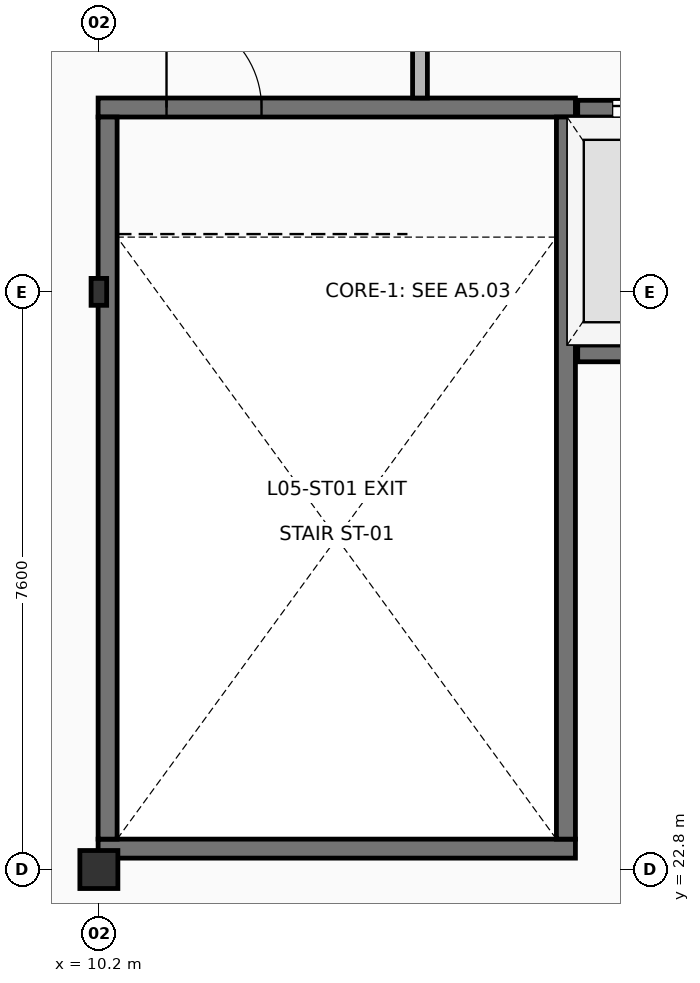
"""IFC4 building model, lengths in metres.
Left out: names, types, materials, properties, quantities, classifications, styles, units other than length and angle.
Written with IfcOpenShell. Run it as: python <this file> out.ifc"""

import sys

from ifc_helpers import new_model, si_unit, direction, frame, frame_2d, origin, origin_2d, place, context, subcontext, project, spatial, rectangle, i_section, extrude, element, fill, save


model = new_model("IFC4")
c1 = context("Model", 3, precision=1e-05, world=origin(), true_north=direction((0.0, 1.0)))
c2 = subcontext(c1, "Body", "Model", "MODEL_VIEW")
j1 = project(units=[si_unit("LENGTHUNIT", "METRE"), si_unit("PLANEANGLEUNIT", "RADIAN")], contexts=[c1])
p1 = place(None, origin())
s1 = spatial("IfcSite", under=j1, at=p1, CompositionType="ELEMENT")
p2 = place(p1, origin())
s2 = spatial("IfcBuilding", under=s1, at=p2, CompositionType="ELEMENT")
p3 = place(p2, frame((0.0, 0.0, 19.8)))
s3 = spatial("IfcBuildingStorey", under=s2, at=p3, CompositionType="ELEMENT", Elevation=19.8)
p4 = place(p3, frame((10.2, 22.8, 0.0), z_axis=(0.0, 0.0, 1.0), x_axis=(1.0, 0.0, 0.0)))
e1 = element("IfcColumn", 1, at=p4, inside=s3, PredefinedType="COLUMN", context=c2, shape_type="SweptSolid", body=[
    extrude(rectangle(XDim=0.5, YDim=0.5, at=origin_2d()), origin(), (0.0, 0.0, 1.0), 4.2),
])
p5 = place(p3, frame((10.2, 30.4, 0.0), z_axis=(0.0, 0.0, 1.0), x_axis=(1.0, 0.0, 0.0)))
e2 = element("IfcColumn", 2, at=p5, inside=s3, PredefinedType="COLUMN", context=c2, shape_type="SweptSolid", body=[
    extrude(i_section(OverallWidth=0.205, OverallDepth=0.354, WebThickness=0.01, FlangeThickness=0.017, at=origin_2d()), origin(), (0.0, 0.0, 1.0), 4.2),
])
p6 = place(p3, frame((10.19, 23.075, 0.0), z_axis=(0.0, 0.0, 1.0), x_axis=(1.0, 0.0, 0.0)))
e3 = element("IfcWall", 3, at=p6, inside=s3, PredefinedType="SHEAR", context=c2, shape_type="SweptSolid", body=[
    extrude(rectangle(XDim=6.28, YDim=0.25, at=frame_2d((3.14, 0.0))), origin(), (0.0, 0.0, 1.0), 3.96),
])
p7 = place(p3, frame((10.19, 32.825, 0.0), z_axis=(0.0, 0.0, 1.0), x_axis=(1.0, 0.0, 0.0)))
e4 = element("IfcWall", 4, at=p7, inside=s3, PredefinedType="SHEAR", context=c2, shape_type="SweptSolid", body=[
    extrude(rectangle(XDim=6.28, YDim=0.25, at=frame_2d((3.14, 0.0))), origin(), (0.0, 0.0, 1.0), 3.96),
])
p8 = place(p7, frame((0.9, 0.0, 0.0)))
e5 = element("IfcOpeningElement", 5, at=p8, cuts=e4, PredefinedType="OPENING", context=c2, shape_type="SweptSolid", body=[
    extrude(rectangle(XDim=1.25, YDim=2.2, at=frame_2d((0.625, 1.1))), frame((0.0, 0.135, 0.0), z_axis=(0.0, -1.0, 0.0), x_axis=(1.0, 0.0, 0.0)), (0.0, 0.0, 1.0), 0.27),
])
for number, where, z_axis, x_axis in (
    (6, (10.315, 23.2, 0.0), (0.0, 0.0, 1.0), (0.0, 1.0, 0.0)),
    (7, (16.345, 23.2, 0.0), (0.0, 0.0, 1.0), (0.0, 1.0, 0.0)),
):
    element("IfcWall", number, at=place(p3, frame(where, z_axis=z_axis, x_axis=x_axis)), inside=s3, PredefinedType="SHEAR", context=c2, shape_type="SweptSolid", body=[
        extrude(rectangle(XDim=9.5, YDim=0.25, at=frame_2d((4.75, 0.0))), origin(), (0.0, 0.0, 1.0), 3.96),
    ])
p9 = place(p3, frame((16.5, 29.59, 0.0), z_axis=(0.0, 0.0, 1.0), x_axis=(1.0, 0.0, 0.0)))
e8 = element("IfcWall", 8, at=p9, inside=s3, PredefinedType="SHEAR", context=c2, shape_type="SweptSolid", body=[
    extrude(rectangle(XDim=2.12, YDim=0.22, at=frame_2d((1.06, 0.0))), origin(), (0.0, 0.0, 1.0), 3.96),
])
p10 = place(p3, frame((16.5, 32.81, 0.0), z_axis=(0.0, 0.0, 1.0), x_axis=(1.0, 0.0, 0.0)))
e9 = element("IfcWall", 9, at=p10, inside=s3, PredefinedType="SHEAR", context=c2, shape_type="SweptSolid", body=[
    extrude(rectangle(XDim=2.12, YDim=0.22, at=frame_2d((1.06, 0.0))), origin(), (0.0, 0.0, 1.0), 3.96),
])
p11 = place(p10, frame((0.46, 0.0, 0.0)))
e10 = element("IfcOpeningElement", 10, at=p11, cuts=e9, PredefinedType="OPENING", context=c2, shape_type="SweptSolid", body=[
    extrude(rectangle(XDim=1.2, YDim=2.2, at=frame_2d((0.6, 1.1))), frame((0.0, 0.12, 0.0), z_axis=(0.0, -1.0, 0.0), x_axis=(1.0, 0.0, 0.0)), (0.0, 0.0, 1.0), 0.24),
])
p12 = place(p3, frame((14.425, 32.95, 0.0), z_axis=(0.0, 0.0, 1.0), x_axis=(0.0, 1.0, 0.0)))
e11 = element("IfcWall", 11, at=p12, inside=s3, PredefinedType="PARTITIONING", context=c2, shape_type="SweptSolid", body=[
    extrude(rectangle(XDim=4.5, YDim=0.195, at=frame_2d((2.25, 0.0))), origin(), (0.0, 0.0, 1.0), 3.96),
])
p13 = place(p12, frame((1.7, 0.0, 0.0)))
e12 = element("IfcOpeningElement", 12, at=p13, cuts=e11, PredefinedType="OPENING", context=c2, shape_type="SweptSolid", body=[
    extrude(rectangle(XDim=1.1, YDim=2.15, at=frame_2d((0.55, 1.075))), frame((0.0, 0.107, 0.0), z_axis=(0.0, -1.0, 0.0), x_axis=(1.0, 0.0, 0.0)), (0.0, 0.0, 1.0), 0.215),
])
p14 = place(p8, origin())
e13 = element("IfcDoor", 13, at=p14, inside=s3, OperationType="SINGLE_SWING_LEFT", PredefinedType="DOOR", context=c2, shape_type="SweptSolid", body=[
    extrude(rectangle(XDim=1.25, YDim=2.2, at=frame_2d((0.625, 1.1))), frame((0.0, 0.025, 0.0), z_axis=(0.0, -1.0, 0.0), x_axis=(1.0, 0.0, 0.0)), (0.0, 0.0, 1.0), 0.05),
])
fill(e5, e13)
p15 = place(p11, origin())
e14 = element("IfcDoor", 14, at=p15, inside=s3, OperationType="DOUBLE_DOOR_SLIDING", PredefinedType="DOOR", context=c2, shape_type="SweptSolid", body=[
    extrude(rectangle(XDim=1.2, YDim=2.2, at=frame_2d((0.6, 1.1))), frame((0.0, 0.025, 0.0), z_axis=(0.0, -1.0, 0.0), x_axis=(1.0, 0.0, 0.0)), (0.0, 0.0, 1.0), 0.05),
])
fill(e10, e14)
save(model, sys.argv[1])
